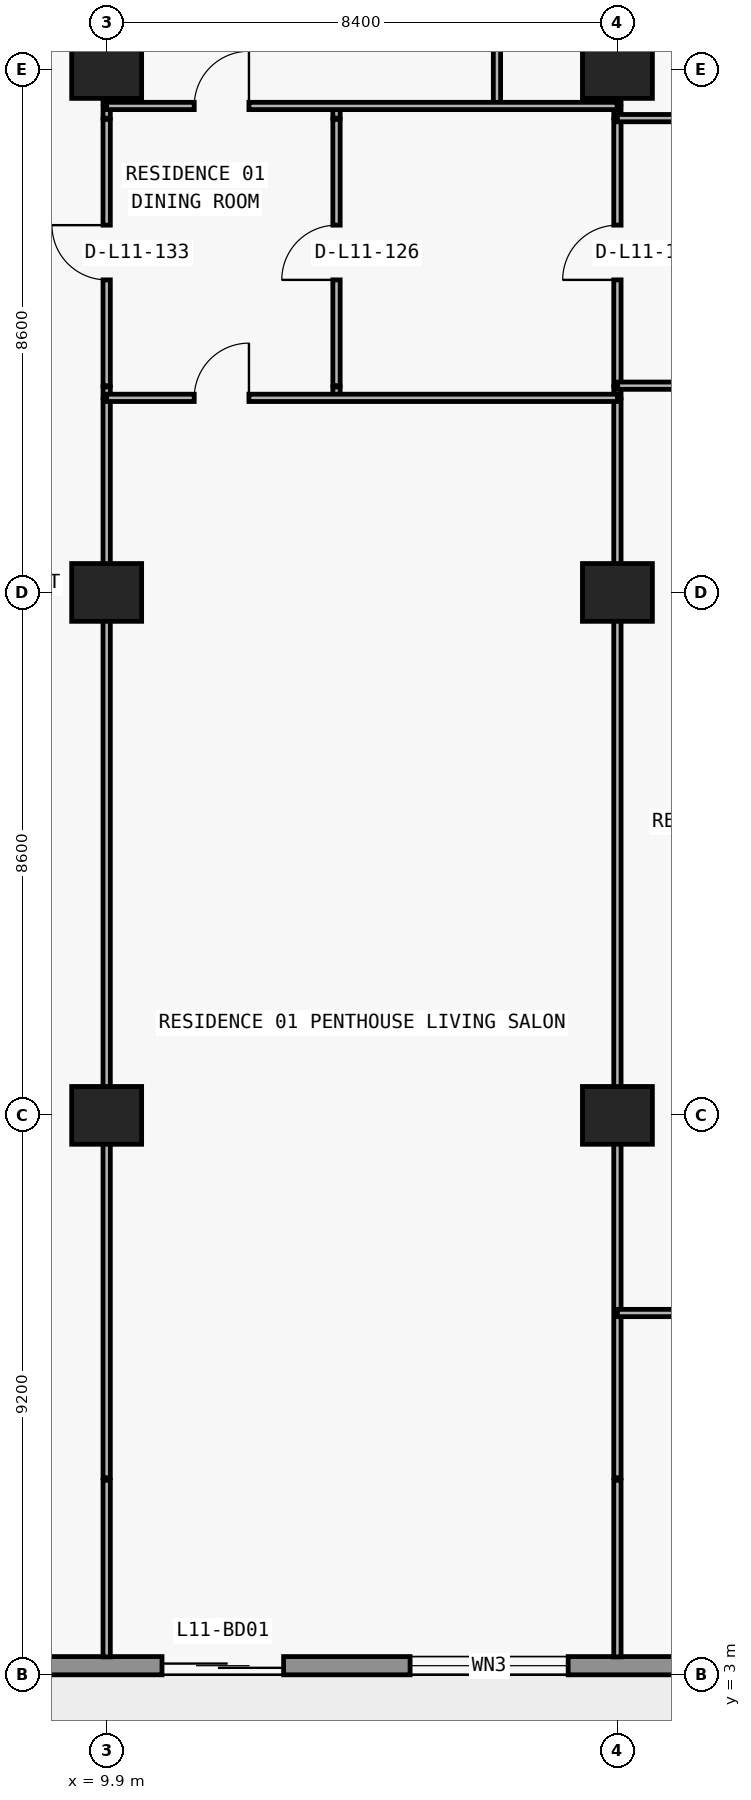
"""IFC4 building model, lengths in metres.
Left out: names, types, materials, properties, quantities, classifications, styles, units other than length and angle.
Written with IfcOpenShell. Run it as: python <this file> out.ifc"""

import sys

from ifc_helpers import new_model, si_unit, direction, frame, frame_2d, origin, origin_2d, place, context, subcontext, project, spatial, rectangle, extrude, element, fill, save


model = new_model("IFC4")
c1 = context("Model", 3, precision=1e-05, world=origin(), true_north=direction((0.0, 1.0)))
c2 = subcontext(c1, "Body", "Model", "MODEL_VIEW")
j1 = project(units=[si_unit("LENGTHUNIT", "METRE"), si_unit("PLANEANGLEUNIT", "RADIAN")], contexts=[c1])
p1 = place(None, origin())
s1 = spatial("IfcSite", under=j1, at=p1, CompositionType="ELEMENT")
p2 = place(p1, origin())
s2 = spatial("IfcBuilding", under=s1, at=p2, CompositionType="ELEMENT")
p3 = place(p2, frame((0.0, 0.0, 46.5)))
s3 = spatial("IfcBuildingStorey", under=s2, at=p3, CompositionType="ELEMENT", Elevation=46.5)
for number, where, z_axis, x_axis in (
    (1, (9.9, 12.2, 0.0), (0.0, 0.0, 1.0), (1.0, 0.0, 0.0)),
    (2, (18.3, 12.2, 0.0), (0.0, 0.0, 1.0), (1.0, 0.0, 0.0)),
    (3, (9.9, 20.8, 0.0), (0.0, 0.0, 1.0), (1.0, 0.0, 0.0)),
    (4, (18.3, 20.8, 0.0), (0.0, 0.0, 1.0), (1.0, 0.0, 0.0)),
    (5, (9.9, 29.4, 0.0), (0.0, 0.0, 1.0), (1.0, 0.0, 0.0)),
    (6, (18.3, 29.4, 0.0), (0.0, 0.0, 1.0), (1.0, 0.0, 0.0)),
):
    element("IfcColumn", number, at=place(p3, frame(where, z_axis=z_axis, x_axis=x_axis)), inside=s3, PredefinedType="COLUMN", context=c2, shape_type="SweptSolid", body=[
        extrude(rectangle(XDim=1.15, YDim=0.95, at=origin_2d()), origin(), (0.0, 0.0, 1.0), 3.05),
    ])
p4 = place(p3, frame((72.7, 3.15, 0.0), z_axis=(0.0, 0.0, 1.0), x_axis=(-1.0, 0.0, 0.0)))
e7 = element("IfcWall", 7, at=p4, inside=s3, PredefinedType="STANDARD", context=c2, shape_type="SweptSolid", body=[
    extrude(rectangle(XDim=67.6, YDim=0.3, at=frame_2d((33.8, 0.0))), origin(), (0.0, 0.0, 1.0), 3.05),
])
p5 = place(p4, frame((59.89, 0.0, 0.0)))
e8 = element("IfcOpeningElement", 8, at=p5, cuts=e7, PredefinedType="OPENING", context=c2, shape_type="SweptSolid", body=[
    extrude(rectangle(XDim=2.0, YDim=2.3, at=frame_2d((1.0, 1.15))), frame((0.0, 0.16, 0.0), z_axis=(0.0, -1.0, 0.0), x_axis=(1.0, 0.0, 0.0)), (0.0, 0.0, 1.0), 0.32),
])
p6 = place(p4, frame((55.21, 0.0, 0.65)))
e9 = element("IfcOpeningElement", 9, at=p6, cuts=e7, PredefinedType="OPENING", context=c2, shape_type="SweptSolid", body=[
    extrude(rectangle(XDim=2.6, YDim=1.85, at=frame_2d((1.3, 0.925))), frame((0.0, 0.16, 0.0), z_axis=(0.0, -1.0, 0.0), x_axis=(1.0, 0.0, 0.0)), (0.0, 0.0, 1.0), 0.32),
])
p7 = place(p4, frame((49.1, 0.0, 0.85)))
e10 = element("IfcOpeningElement", 10, at=p7, cuts=e7, PredefinedType="OPENING", context=c2, shape_type="SweptSolid", body=[
    extrude(rectangle(XDim=2.2, YDim=1.55, at=frame_2d((1.1, 0.775))), frame((0.0, 0.16, 0.0), z_axis=(0.0, -1.0, 0.0), x_axis=(1.0, 0.0, 0.0)), (0.0, 0.0, 1.0), 0.32),
])
p8 = place(p4, frame((42.69, 0.0, 0.0)))
e11 = element("IfcOpeningElement", 11, at=p8, cuts=e7, PredefinedType="OPENING", context=c2, shape_type="SweptSolid", body=[
    extrude(rectangle(XDim=2.0, YDim=2.3, at=frame_2d((1.0, 1.15))), frame((0.0, 0.16, 0.0), z_axis=(0.0, -1.0, 0.0), x_axis=(1.0, 0.0, 0.0)), (0.0, 0.0, 1.0), 0.32),
])
p9 = place(p4, frame((38.59, 0.0, 0.85)))
e12 = element("IfcOpeningElement", 12, at=p9, cuts=e7, PredefinedType="OPENING", context=c2, shape_type="SweptSolid", body=[
    extrude(rectangle(XDim=1.8, YDim=1.55, at=frame_2d((0.9, 0.775))), frame((0.0, 0.16, 0.0), z_axis=(0.0, -1.0, 0.0), x_axis=(1.0, 0.0, 0.0)), (0.0, 0.0, 1.0), 0.32),
])
p10 = place(p4, frame((30.914, 0.0, 0.85)))
e13 = element("IfcOpeningElement", 13, at=p10, cuts=e7, PredefinedType="OPENING", context=c2, shape_type="SweptSolid", body=[
    extrude(rectangle(XDim=2.2, YDim=1.55, at=frame_2d((1.1, 0.775))), frame((0.0, 0.16, 0.0), z_axis=(0.0, -1.0, 0.0), x_axis=(1.0, 0.0, 0.0)), (0.0, 0.0, 1.0), 0.32),
])
p11 = place(p4, frame((26.69, 0.0, 0.0)))
e14 = element("IfcOpeningElement", 14, at=p11, cuts=e7, PredefinedType="OPENING", context=c2, shape_type="SweptSolid", body=[
    extrude(rectangle(XDim=2.0, YDim=2.3, at=frame_2d((1.0, 1.15))), frame((0.0, 0.16, 0.0), z_axis=(0.0, -1.0, 0.0), x_axis=(1.0, 0.0, 0.0)), (0.0, 0.0, 1.0), 0.32),
])
p12 = place(p4, frame((22.59, 0.0, 0.85)))
e15 = element("IfcOpeningElement", 15, at=p12, cuts=e7, PredefinedType="OPENING", context=c2, shape_type="SweptSolid", body=[
    extrude(rectangle(XDim=1.8, YDim=1.55, at=frame_2d((0.9, 0.775))), frame((0.0, 0.16, 0.0), z_axis=(0.0, -1.0, 0.0), x_axis=(1.0, 0.0, 0.0)), (0.0, 0.0, 1.0), 0.32),
])
p13 = place(p4, frame((18.69, 0.0, 0.0)))
e16 = element("IfcOpeningElement", 16, at=p13, cuts=e7, PredefinedType="OPENING", context=c2, shape_type="SweptSolid", body=[
    extrude(rectangle(XDim=2.0, YDim=2.3, at=frame_2d((1.0, 1.15))), frame((0.0, 0.16, 0.0), z_axis=(0.0, -1.0, 0.0), x_axis=(1.0, 0.0, 0.0)), (0.0, 0.0, 1.0), 0.32),
])
p14 = place(p4, frame((14.01, 0.0, 0.65)))
e17 = element("IfcOpeningElement", 17, at=p14, cuts=e7, PredefinedType="OPENING", context=c2, shape_type="SweptSolid", body=[
    extrude(rectangle(XDim=2.6, YDim=1.85, at=frame_2d((1.3, 0.925))), frame((0.0, 0.16, 0.0), z_axis=(0.0, -1.0, 0.0), x_axis=(1.0, 0.0, 0.0)), (0.0, 0.0, 1.0), 0.32),
])
p15 = place(p4, frame((7.9, 0.0, 0.85)))
e18 = element("IfcOpeningElement", 18, at=p15, cuts=e7, PredefinedType="OPENING", context=c2, shape_type="SweptSolid", body=[
    extrude(rectangle(XDim=2.2, YDim=1.55, at=frame_2d((1.1, 0.775))), frame((0.0, 0.16, 0.0), z_axis=(0.0, -1.0, 0.0), x_axis=(1.0, 0.0, 0.0)), (0.0, 0.0, 1.0), 0.32),
])
p16 = place(p3, frame((9.9, 3.295, 0.0), z_axis=(0.0, 0.0, 1.0), x_axis=(0.0, 1.0, 0.0)))
e19 = element("IfcWall", 19, at=p16, inside=s3, PredefinedType="PARTITIONING", context=c2, shape_type="SweptSolid", body=[
    extrude(rectangle(XDim=2.905, YDim=0.12, at=frame_2d((1.453, 0.0))), origin(), (0.0, 0.0, 1.0), 3.05),
])
p17 = place(p3, frame((9.9, 6.24, 0.0), z_axis=(0.0, 0.0, 1.0), x_axis=(0.0, 1.0, 0.0)))
e20 = element("IfcWall", 20, at=p17, inside=s3, PredefinedType="PARTITIONING", context=c2, shape_type="SweptSolid", body=[
    extrude(rectangle(XDim=17.73, YDim=0.12, at=frame_2d((8.865, 0.0))), origin(), (0.0, 0.0, 1.0), 2.11),
])
p18 = place(p3, frame((9.9, 24.0, 0.0), z_axis=(0.0, 0.0, 1.0), x_axis=(0.0, 1.0, 0.0)))
e21 = element("IfcWall", 21, at=p18, inside=s3, PredefinedType="PARTITIONING", context=c2, shape_type="SweptSolid", body=[
    extrude(rectangle(XDim=0.18, YDim=0.12, at=frame_2d((0.09, 0.0))), origin(), (0.0, 0.0, 1.0), 2.11),
])
p19 = place(p3, frame((9.9, 24.2, 0.0), z_axis=(0.0, 0.0, 1.0), x_axis=(0.0, 1.0, 0.0)))
e22 = element("IfcWall", 22, at=p19, inside=s3, PredefinedType="PARTITIONING", context=c2, shape_type="SweptSolid", body=[
    extrude(rectangle(XDim=4.38, YDim=0.12, at=frame_2d((2.19, 0.0))), origin(), (0.0, 0.0, 1.0), 2.11),
])
p20 = place(p19, frame((1.74, 0.0, 0.0)))
e23 = element("IfcOpeningElement", 23, at=p20, cuts=e22, PredefinedType="OPENING", context=c2, shape_type="SweptSolid", body=[
    extrude(rectangle(XDim=0.9, YDim=2.06, at=frame_2d((0.45, 1.03))), frame((0.0, 0.07, 0.0), z_axis=(0.0, -1.0, 0.0), x_axis=(1.0, 0.0, 0.0)), (0.0, 0.0, 1.0), 0.14),
])
p21 = place(p3, frame((9.9, 28.6, 0.0), z_axis=(0.0, 0.0, 1.0), x_axis=(0.0, 1.0, 0.0)))
e24 = element("IfcWall", 24, at=p21, inside=s3, PredefinedType="PARTITIONING", context=c2, shape_type="SweptSolid", body=[
    extrude(rectangle(XDim=0.18, YDim=0.12, at=frame_2d((0.09, 0.0))), origin(), (0.0, 0.0, 1.0), 2.11),
])
p22 = place(p3, frame((9.9, 28.84, 0.0), z_axis=(0.0, 0.0, 1.0), x_axis=(0.0, 1.0, 0.0)))
e25 = element("IfcWall", 25, at=p22, inside=s3, PredefinedType="PARTITIONING", context=c2, shape_type="SweptSolid", body=[
    extrude(rectangle(XDim=5.16, YDim=0.12, at=frame_2d((2.58, 0.0))), origin(), (0.0, 0.0, 1.0), 2.11),
])
p23 = place(p3, frame((13.68, 24.0, 0.0), z_axis=(0.0, 0.0, 1.0), x_axis=(0.0, 1.0, 0.0)))
e26 = element("IfcWall", 26, at=p23, inside=s3, PredefinedType="PARTITIONING", context=c2, shape_type="SweptSolid", body=[
    extrude(rectangle(XDim=0.18, YDim=0.12, at=frame_2d((0.09, 0.0))), origin(), (0.0, 0.0, 1.0), 3.05),
])
p24 = place(p3, frame((13.68, 24.2, 0.0), z_axis=(0.0, 0.0, 1.0), x_axis=(0.0, 1.0, 0.0)))
e27 = element("IfcWall", 27, at=p24, inside=s3, PredefinedType="PARTITIONING", context=c2, shape_type="SweptSolid", body=[
    extrude(rectangle(XDim=4.38, YDim=0.12, at=frame_2d((2.19, 0.0))), origin(), (0.0, 0.0, 1.0), 3.05),
])
p25 = place(p24, frame((1.74, 0.0, 0.0)))
e28 = element("IfcOpeningElement", 28, at=p25, cuts=e27, PredefinedType="OPENING", context=c2, shape_type="SweptSolid", body=[
    extrude(rectangle(XDim=0.9, YDim=2.15, at=frame_2d((0.45, 1.075))), frame((0.0, 0.07, 0.0), z_axis=(0.0, -1.0, 0.0), x_axis=(1.0, 0.0, 0.0)), (0.0, 0.0, 1.0), 0.14),
])
p26 = place(p3, frame((13.68, 28.6, 0.0), z_axis=(0.0, 0.0, 1.0), x_axis=(0.0, 1.0, 0.0)))
e29 = element("IfcWall", 29, at=p26, inside=s3, PredefinedType="PARTITIONING", context=c2, shape_type="SweptSolid", body=[
    extrude(rectangle(XDim=0.18, YDim=0.12, at=frame_2d((0.09, 0.0))), origin(), (0.0, 0.0, 1.0), 3.05),
])
p27 = place(p3, frame((16.319, 28.84, 0.0), z_axis=(0.0, 0.0, 1.0), x_axis=(0.0, 1.0, 0.0)))
e30 = element("IfcWall", 30, at=p27, inside=s3, PredefinedType="PARTITIONING", context=c2, shape_type="SweptSolid", body=[
    extrude(rectangle(XDim=5.16, YDim=0.12, at=frame_2d((2.58, 0.0))), origin(), (0.0, 0.0, 1.0), 3.05),
])
p28 = place(p27, frame((2.155, 0.0, 0.0)))
e31 = element("IfcOpeningElement", 31, at=p28, cuts=e30, PredefinedType="OPENING", context=c2, shape_type="SweptSolid", body=[
    extrude(rectangle(XDim=0.85, YDim=2.1, at=frame_2d((0.425, 1.05))), frame((0.0, 0.07, 0.0), z_axis=(0.0, -1.0, 0.0), x_axis=(1.0, 0.0, 0.0)), (0.0, 0.0, 1.0), 0.14),
])
p29 = place(p3, frame((18.3, 3.295, 0.0), z_axis=(0.0, 0.0, 1.0), x_axis=(0.0, 1.0, 0.0)))
e32 = element("IfcWall", 32, at=p29, inside=s3, PredefinedType="PARTITIONING", context=c2, shape_type="SweptSolid", body=[
    extrude(rectangle(XDim=2.905, YDim=0.12, at=frame_2d((1.453, 0.0))), origin(), (0.0, 0.0, 1.0), 3.05),
])
p30 = place(p3, frame((18.3, 6.24, 0.0), z_axis=(0.0, 0.0, 1.0), x_axis=(0.0, 1.0, 0.0)))
e33 = element("IfcWall", 33, at=p30, inside=s3, PredefinedType="PARTITIONING", context=c2, shape_type="SweptSolid", body=[
    extrude(rectangle(XDim=17.73, YDim=0.12, at=frame_2d((8.865, 0.0))), origin(), (0.0, 0.0, 1.0), 2.11),
])
p31 = place(p3, frame((18.3, 24.0, 0.0), z_axis=(0.0, 0.0, 1.0), x_axis=(0.0, 1.0, 0.0)))
e34 = element("IfcWall", 34, at=p31, inside=s3, PredefinedType="PARTITIONING", context=c2, shape_type="SweptSolid", body=[
    extrude(rectangle(XDim=0.18, YDim=0.12, at=frame_2d((0.09, 0.0))), origin(), (0.0, 0.0, 1.0), 2.11),
])
p32 = place(p3, frame((18.3, 24.2, 0.0), z_axis=(0.0, 0.0, 1.0), x_axis=(0.0, 1.0, 0.0)))
e35 = element("IfcWall", 35, at=p32, inside=s3, PredefinedType="PARTITIONING", context=c2, shape_type="SweptSolid", body=[
    extrude(rectangle(XDim=4.38, YDim=0.12, at=frame_2d((2.19, 0.0))), origin(), (0.0, 0.0, 1.0), 2.11),
])
p33 = place(p32, frame((1.74, 0.0, 0.0)))
e36 = element("IfcOpeningElement", 36, at=p33, cuts=e35, PredefinedType="OPENING", context=c2, shape_type="SweptSolid", body=[
    extrude(rectangle(XDim=0.9, YDim=2.06, at=frame_2d((0.45, 1.03))), frame((0.0, 0.07, 0.0), z_axis=(0.0, -1.0, 0.0), x_axis=(1.0, 0.0, 0.0)), (0.0, 0.0, 1.0), 0.14),
])
p34 = place(p3, frame((18.3, 28.6, 0.0), z_axis=(0.0, 0.0, 1.0), x_axis=(0.0, 1.0, 0.0)))
e37 = element("IfcWall", 37, at=p34, inside=s3, PredefinedType="PARTITIONING", context=c2, shape_type="SweptSolid", body=[
    extrude(rectangle(XDim=0.18, YDim=0.12, at=frame_2d((0.09, 0.0))), origin(), (0.0, 0.0, 1.0), 2.11),
])
p35 = place(p3, frame((18.3, 28.84, 0.0), z_axis=(0.0, 0.0, 1.0), x_axis=(0.0, 1.0, 0.0)))
e38 = element("IfcWall", 38, at=p35, inside=s3, PredefinedType="PARTITIONING", context=c2, shape_type="SweptSolid", body=[
    extrude(rectangle(XDim=5.16, YDim=0.12, at=frame_2d((2.58, 0.0))), origin(), (0.0, 0.0, 1.0), 2.11),
])
p36 = place(p3, frame((18.3, 8.95, 0.0), z_axis=(0.0, 0.0, 1.0), x_axis=(1.0, 0.0, 0.0)))
e39 = element("IfcWall", 39, at=p36, inside=s3, PredefinedType="PARTITIONING", context=c2, shape_type="SweptSolid", body=[
    extrude(rectangle(XDim=8.35, YDim=0.12, at=frame_2d((4.175, 0.0))), origin(), (0.0, 0.0, 1.0), 3.05),
])
p37 = place(p36, frame((3.725, 0.0, 0.0)))
e40 = element("IfcOpeningElement", 40, at=p37, cuts=e39, PredefinedType="OPENING", context=c2, shape_type="SweptSolid", body=[
    extrude(rectangle(XDim=0.9, YDim=2.15, at=frame_2d((0.45, 1.075))), frame((0.0, 0.07, 0.0), z_axis=(0.0, -1.0, 0.0), x_axis=(1.0, 0.0, 0.0)), (0.0, 0.0, 1.0), 0.14),
])
p38 = place(p3, frame((9.9, 24.0, 0.0), z_axis=(0.0, 0.0, 1.0), x_axis=(1.0, 0.0, 0.0)))
e41 = element("IfcWall", 41, at=p38, inside=s3, PredefinedType="PARTITIONING", context=c2, shape_type="SweptSolid", body=[
    extrude(rectangle(XDim=8.4, YDim=0.12, at=frame_2d((4.2, 0.0))), origin(), (0.0, 0.0, 1.0), 3.05),
])
p39 = place(p38, frame((1.44, 0.0, 0.0)))
e42 = element("IfcOpeningElement", 42, at=p39, cuts=e41, PredefinedType="OPENING", context=c2, shape_type="SweptSolid", body=[
    extrude(rectangle(XDim=0.9, YDim=2.15, at=frame_2d((0.45, 1.075))), frame((0.0, 0.07, 0.0), z_axis=(0.0, -1.0, 0.0), x_axis=(1.0, 0.0, 0.0)), (0.0, 0.0, 1.0), 0.14),
])
p40 = place(p3, frame((18.305, 24.2, 0.0), z_axis=(0.0, 0.0, 1.0), x_axis=(1.0, 0.0, 0.0)))
e43 = element("IfcWall", 43, at=p40, inside=s3, PredefinedType="PARTITIONING", context=c2, shape_type="SweptSolid", body=[
    extrude(rectangle(XDim=8.125, YDim=0.12, at=frame_2d((4.062, 0.0))), origin(), (0.0, 0.0, 1.0), 3.05),
])
p41 = place(p40, frame((3.613, 0.0, 0.0)))
e44 = element("IfcOpeningElement", 44, at=p41, cuts=e43, PredefinedType="OPENING", context=c2, shape_type="SweptSolid", body=[
    extrude(rectangle(XDim=0.9, YDim=2.15, at=frame_2d((0.45, 1.075))), frame((0.0, 0.07, 0.0), z_axis=(0.0, -1.0, 0.0), x_axis=(1.0, 0.0, 0.0)), (0.0, 0.0, 1.0), 0.14),
])
p42 = place(p3, frame((18.3, 28.6, 0.0), z_axis=(0.0, 0.0, 1.0), x_axis=(1.0, 0.0, 0.0)))
e45 = element("IfcWall", 45, at=p42, inside=s3, PredefinedType="PARTITIONING", context=c2, shape_type="SweptSolid", body=[
    extrude(rectangle(XDim=8.13, YDim=0.12, at=frame_2d((4.065, 0.0))), origin(), (0.0, 0.0, 1.0), 3.05),
])
p43 = place(p42, frame((2.861, 0.0, 0.0)))
e46 = element("IfcOpeningElement", 46, at=p43, cuts=e45, PredefinedType="OPENING", context=c2, shape_type="SweptSolid", body=[
    extrude(rectangle(XDim=0.9, YDim=2.15, at=frame_2d((0.45, 1.075))), frame((0.0, 0.07, 0.0), z_axis=(0.0, -1.0, 0.0), x_axis=(1.0, 0.0, 0.0)), (0.0, 0.0, 1.0), 0.14),
])
p44 = place(p3, frame((9.9, 28.8, 0.0), z_axis=(0.0, 0.0, 1.0), x_axis=(1.0, 0.0, 0.0)))
e47 = element("IfcWall", 47, at=p44, inside=s3, PredefinedType="PARTITIONING", context=c2, shape_type="SweptSolid", body=[
    extrude(rectangle(XDim=8.395, YDim=0.12, at=frame_2d((4.198, 0.0))), origin(), (0.0, 0.0, 1.0), 3.05),
])
p45 = place(p44, frame((1.44, 0.0, 0.0)))
e48 = element("IfcOpeningElement", 48, at=p45, cuts=e47, PredefinedType="OPENING", context=c2, shape_type="SweptSolid", body=[
    extrude(rectangle(XDim=0.9, YDim=2.15, at=frame_2d((0.45, 1.075))), frame((0.0, 0.07, 0.0), z_axis=(0.0, -1.0, 0.0), x_axis=(1.0, 0.0, 0.0)), (0.0, 0.0, 1.0), 0.14),
])
p46 = place(p5, origin())
e49 = element("IfcDoor", 49, at=p46, inside=s3, OperationType="DOUBLE_DOOR_SLIDING", PredefinedType="DOOR", context=c2, shape_type="SweptSolid", body=[
    extrude(rectangle(XDim=2.0, YDim=2.3, at=frame_2d((1.0, 1.15))), frame((0.0, 0.025, 0.0), z_axis=(0.0, -1.0, 0.0), x_axis=(1.0, 0.0, 0.0)), (0.0, 0.0, 1.0), 0.05),
])
fill(e8, e49)
p47 = place(p6, origin())
e50 = element("IfcWindow", 50, at=p47, inside=s3, PartitioningType="SINGLE_PANEL", PredefinedType="WINDOW", context=c2, shape_type="SweptSolid", body=[
    extrude(rectangle(XDim=2.6, YDim=1.85, at=frame_2d((1.3, 0.925))), frame((0.0, 0.03, 0.0), z_axis=(0.0, -1.0, 0.0), x_axis=(1.0, 0.0, 0.0)), (0.0, 0.0, 1.0), 0.06),
])
fill(e9, e50)
p48 = place(p45, origin())
e51 = element("IfcDoor", 51, at=p48, inside=s3, OperationType="SINGLE_SWING_RIGHT", PredefinedType="DOOR", context=c2, shape_type="SweptSolid", body=[
    extrude(rectangle(XDim=0.9, YDim=2.15, at=frame_2d((0.45, 1.075))), frame((0.0, 0.025, 0.0), z_axis=(0.0, -1.0, 0.0), x_axis=(1.0, 0.0, 0.0)), (0.0, 0.0, 1.0), 0.05),
])
fill(e48, e51)
p49 = place(p25, origin())
e52 = element("IfcDoor", 52, at=p49, inside=s3, OperationType="SINGLE_SWING_LEFT", PredefinedType="DOOR", context=c2, shape_type="SweptSolid", body=[
    extrude(rectangle(XDim=0.9, YDim=2.15, at=frame_2d((0.45, 1.075))), frame((0.0, 0.025, 0.0), z_axis=(0.0, -1.0, 0.0), x_axis=(1.0, 0.0, 0.0)), (0.0, 0.0, 1.0), 0.05),
])
fill(e28, e52)
p50 = place(p39, origin())
e53 = element("IfcDoor", 53, at=p50, inside=s3, OperationType="SINGLE_SWING_RIGHT", PredefinedType="DOOR", context=c2, shape_type="SweptSolid", body=[
    extrude(rectangle(XDim=0.9, YDim=2.15, at=frame_2d((0.45, 1.075))), frame((0.0, 0.025, 0.0), z_axis=(0.0, -1.0, 0.0), x_axis=(1.0, 0.0, 0.0)), (0.0, 0.0, 1.0), 0.05),
])
fill(e42, e53)
p51 = place(p33, origin())
e54 = element("IfcDoor", 54, at=p51, inside=s3, OperationType="SINGLE_SWING_LEFT", PredefinedType="DOOR", context=c2, shape_type="SweptSolid", body=[
    extrude(rectangle(XDim=0.9, YDim=2.06, at=frame_2d((0.45, 1.03))), frame((0.0, 0.025, 0.0), z_axis=(0.0, -1.0, 0.0), x_axis=(1.0, 0.0, 0.0)), (0.0, 0.0, 1.0), 0.05),
])
fill(e36, e54)
p52 = place(p20, origin())
e55 = element("IfcDoor", 55, at=p52, inside=s3, OperationType="SINGLE_SWING_RIGHT", PredefinedType="DOOR", context=c2, shape_type="SweptSolid", body=[
    extrude(rectangle(XDim=0.9, YDim=2.06, at=frame_2d((0.45, 1.03))), frame((0.0, 0.025, 0.0), z_axis=(0.0, -1.0, 0.0), x_axis=(1.0, 0.0, 0.0)), (0.0, 0.0, 1.0), 0.05),
])
fill(e23, e55)
save(model, sys.argv[1])
